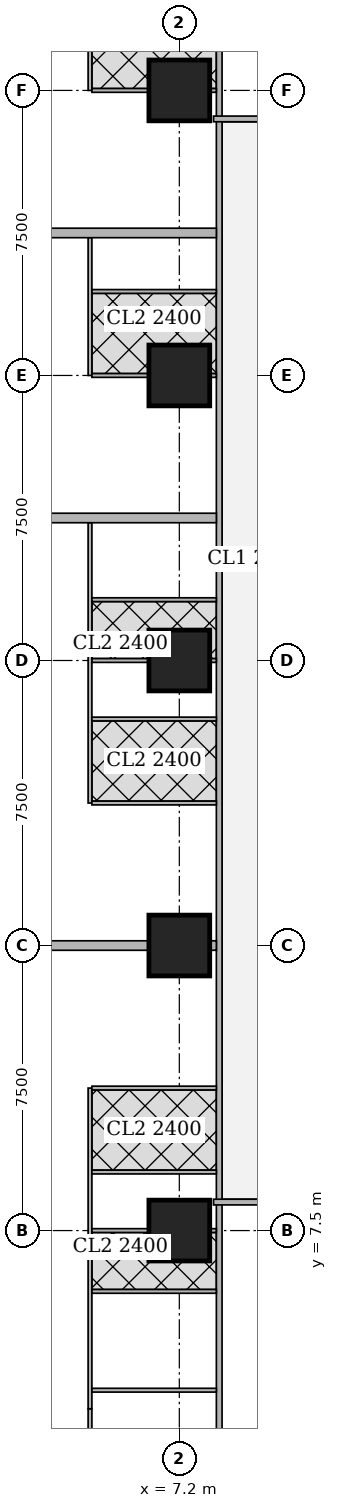
"""IFC4 building model, lengths in metres.
Left out: names, types, materials, properties, quantities, classifications, styles, units other than length and angle.
Written with IfcOpenShell. Run it as: python <this file> out.ifc"""

import sys

from ifc_helpers import new_model, si_unit, direction, frame, frame_2d, origin, origin_2d, place, context, subcontext, project, spatial, rectangle, extrude, element, fill, save


model = new_model("IFC4")
c1 = context("Model", 3, precision=1e-05, world=origin(), true_north=direction((0.0, 1.0)))
c2 = subcontext(c1, "Body", "Model", "MODEL_VIEW")
j1 = project(units=[si_unit("LENGTHUNIT", "METRE"), si_unit("PLANEANGLEUNIT", "RADIAN")], contexts=[c1])
p1 = place(None, origin())
s1 = spatial("IfcSite", under=j1, at=p1, CompositionType="ELEMENT")
p2 = place(p1, origin())
s2 = spatial("IfcBuilding", under=s1, at=p2, CompositionType="ELEMENT")
p3 = place(p2, frame((0.0, 0.0, 100.4)))
s3 = spatial("IfcBuildingStorey", under=s2, at=p3, CompositionType="ELEMENT", Elevation=100.4)
for number, where, z_axis, x_axis in (
    (1, (7.2, 7.5, 0.0), (0.0, 0.0, 1.0), (1.0, 0.0, 0.0)),
    (2, (7.2, 15.0, 0.0), (0.0, 0.0, 1.0), (1.0, 0.0, 0.0)),
    (3, (7.2, 22.5, 0.0), (0.0, 0.0, 1.0), (1.0, 0.0, 0.0)),
    (4, (7.2, 30.0, 0.0), (0.0, 0.0, 1.0), (1.0, 0.0, 0.0)),
    (5, (7.2, 37.5, 0.0), (0.0, 0.0, 1.0), (1.0, 0.0, 0.0)),
):
    element("IfcColumn", number, at=place(p3, frame(where, z_axis=z_axis, x_axis=x_axis)), inside=s3, PredefinedType="COLUMN", context=c2, shape_type="SweptSolid", body=[
        extrude(rectangle(XDim=1.6, YDim=1.6, at=origin_2d()), origin(), (0.0, 0.0, 1.0), 3.75),
    ])
p4 = place(p3, frame((8.25, 2.126, 0.0), z_axis=(0.0, 0.0, 1.0), x_axis=(0.0, 1.0, 0.0)))
e6 = element("IfcWall", 6, at=p4, inside=s3, PredefinedType="SOLIDWALL", context=c2, shape_type="SweptSolid", body=[
    extrude(rectangle(XDim=40.773, YDim=0.15, at=frame_2d((20.386, 0.0))), origin(), (0.0, 0.0, 1.0), 3.5),
])
p5 = place(p4, frame((10.286, 0.0, 0.0)))
e7 = element("IfcOpeningElement", 7, at=p5, cuts=e6, PredefinedType="OPENING", context=c2, shape_type="SweptSolid", body=[
    extrude(rectangle(XDim=1.0, YDim=2.1, at=frame_2d((0.5, 1.05))), frame((0.0, 0.085, 0.0), z_axis=(0.0, -1.0, 0.0), x_axis=(1.0, 0.0, 0.0)), (0.0, 0.0, 1.0), 0.17),
])
p6 = place(p4, frame((14.461, 0.0, 0.0)))
e8 = element("IfcOpeningElement", 8, at=p6, cuts=e6, PredefinedType="OPENING", context=c2, shape_type="SweptSolid", body=[
    extrude(rectangle(XDim=1.0, YDim=2.1, at=frame_2d((0.5, 1.05))), frame((0.0, 0.085, 0.0), z_axis=(0.0, -1.0, 0.0), x_axis=(1.0, 0.0, 0.0)), (0.0, 0.0, 1.0), 0.17),
])
p7 = place(p4, frame((25.287, 0.0, 0.0)))
e9 = element("IfcOpeningElement", 9, at=p7, cuts=e6, PredefinedType="OPENING", context=c2, shape_type="SweptSolid", body=[
    extrude(rectangle(XDim=1.0, YDim=2.1, at=frame_2d((0.5, 1.05))), frame((0.0, 0.085, 0.0), z_axis=(0.0, -1.0, 0.0), x_axis=(1.0, 0.0, 0.0)), (0.0, 0.0, 1.0), 0.17),
])
p8 = place(p4, frame((32.787, 0.0, 0.0)))
e10 = element("IfcOpeningElement", 10, at=p8, cuts=e6, PredefinedType="OPENING", context=c2, shape_type="SweptSolid", body=[
    extrude(rectangle(XDim=1.0, YDim=2.1, at=frame_2d((0.5, 1.05))), frame((0.0, 0.085, 0.0), z_axis=(0.0, -1.0, 0.0), x_axis=(1.0, 0.0, 0.0)), (0.0, 0.0, 1.0), 0.17),
])
p9 = place(p3, frame((13.599, 8.25, 0.0), z_axis=(0.0, 0.0, 1.0), x_axis=(-1.0, 0.0, 0.0)))
e11 = element("IfcWall", 11, at=p9, inside=s3, PredefinedType="SOLIDWALL", context=c2, shape_type="SweptSolid", body=[
    extrude(rectangle(XDim=5.499, YDim=0.15, at=frame_2d((2.75, 0.0))), origin(), (0.0, 0.0, 1.0), 3.5),
])
p10 = place(p9, frame((1.774, 0.0, 0.0)))
e12 = element("IfcOpeningElement", 12, at=p10, cuts=e11, PredefinedType="OPENING", context=c2, shape_type="SweptSolid", body=[
    extrude(rectangle(XDim=1.0, YDim=2.1, at=frame_2d((0.5, 1.05))), frame((0.0, 0.085, 0.0), z_axis=(0.0, -1.0, 0.0), x_axis=(1.0, 0.0, 0.0)), (0.0, 0.0, 1.0), 0.17),
])
p11 = place(p3, frame((8.1, 36.75, 0.0), z_axis=(0.0, 0.0, 1.0), x_axis=(1.0, 0.0, 0.0)))
e13 = element("IfcWall", 13, at=p11, inside=s3, PredefinedType="SOLIDWALL", context=c2, shape_type="SweptSolid", body=[
    extrude(rectangle(XDim=5.499, YDim=0.15, at=frame_2d((2.75, 0.0))), origin(), (0.0, 0.0, 1.0), 3.5),
])
p12 = place(p11, frame((2.725, 0.0, 0.0)))
e14 = element("IfcOpeningElement", 14, at=p12, cuts=e13, PredefinedType="OPENING", context=c2, shape_type="SweptSolid", body=[
    extrude(rectangle(XDim=1.0, YDim=2.1, at=frame_2d((0.5, 1.05))), frame((0.0, 0.085, 0.0), z_axis=(0.0, -1.0, 0.0), x_axis=(1.0, 0.0, 0.0)), (0.0, 0.0, 1.0), 0.17),
])
p13 = place(p3, frame((4.85, 0.326, 0.0), z_axis=(0.0, 0.0, 1.0), x_axis=(0.0, 1.0, 0.0)))
e15 = element("IfcWall", 15, at=p13, inside=s3, PredefinedType="PARTITIONING", context=c2, shape_type="SweptSolid", body=[
    extrude(rectangle(XDim=2.486, YDim=0.1, at=frame_2d((1.243, 0.0))), origin(), (0.0, 0.0, 1.0), 2.05),
])
p14 = place(p3, frame((4.85, 2.812, 0.0), z_axis=(0.0, 0.0, 1.0), x_axis=(0.0, 1.0, 0.0)))
e16 = element("IfcWall", 16, at=p14, inside=s3, PredefinedType="PARTITIONING", context=c2, shape_type="SweptSolid", body=[
    extrude(rectangle(XDim=8.438, YDim=0.1, at=frame_2d((4.219, 0.0))), origin(), (0.0, 0.0, 1.0), 3.5),
])
p15 = place(p14, frame((6.883, 0.0, 0.0)))
e17 = element("IfcOpeningElement", 17, at=p15, cuts=e16, PredefinedType="OPENING", context=c2, shape_type="SweptSolid", body=[
    extrude(rectangle(XDim=0.9, YDim=2.1, at=frame_2d((0.45, 1.05))), frame((0.0, 0.06, 0.0), z_axis=(0.0, -1.0, 0.0), x_axis=(1.0, 0.0, 0.0)), (0.0, 0.0, 1.0), 0.12),
])
p16 = place(p14, frame((3.438, 0.0, 0.0)))
e18 = element("IfcOpeningElement", 18, at=p16, cuts=e16, PredefinedType="OPENING", context=c2, shape_type="SweptSolid", body=[
    extrude(rectangle(XDim=0.9, YDim=2.1, at=frame_2d((0.45, 1.05))), frame((0.0, 0.06, 0.0), z_axis=(0.0, -1.0, 0.0), x_axis=(1.0, 0.0, 0.0)), (0.0, 0.0, 1.0), 0.12),
])
p17 = place(p14, frame((5.008, 0.0, 0.0)))
e19 = element("IfcOpeningElement", 19, at=p17, cuts=e16, PredefinedType="OPENING", context=c2, shape_type="SweptSolid", body=[
    extrude(rectangle(XDim=0.9, YDim=2.1, at=frame_2d((0.45, 1.05))), frame((0.0, 0.06, 0.0), z_axis=(0.0, -1.0, 0.0), x_axis=(1.0, 0.0, 0.0)), (0.0, 0.0, 1.0), 0.12),
])
p18 = place(p14, frame((1.563, 0.0, 0.0)))
e20 = element("IfcOpeningElement", 20, at=p18, cuts=e16, PredefinedType="OPENING", context=c2, shape_type="SweptSolid", body=[
    extrude(rectangle(XDim=0.9, YDim=2.1, at=frame_2d((0.45, 1.05))), frame((0.0, 0.06, 0.0), z_axis=(0.0, -1.0, 0.0), x_axis=(1.0, 0.0, 0.0)), (0.0, 0.0, 1.0), 0.12),
])
p19 = place(p3, frame((4.9, 7.5, 0.0), z_axis=(0.0, 0.0, 1.0), x_axis=(1.0, 0.0, 0.0)))
e21 = element("IfcWall", 21, at=p19, inside=s3, PredefinedType="PARTITIONING", context=c2, shape_type="SweptSolid", body=[
    extrude(rectangle(XDim=1.499, YDim=0.1, at=frame_2d((0.75, 0.0))), origin(), (0.0, 0.0, 1.0), 3.5),
])
p20 = place(p3, frame((8.001, 7.5, 0.0), z_axis=(0.0, 0.0, 1.0), x_axis=(1.0, 0.0, 0.0)))
e22 = element("IfcWall", 22, at=p20, inside=s3, PredefinedType="PARTITIONING", context=c2, shape_type="SweptSolid", body=[
    extrude(rectangle(XDim=0.174, YDim=0.1, at=frame_2d((0.087, 0.0))), origin(), (0.0, 0.0, 1.0), 3.5),
])
for number, where, z_axis, x_axis in (
    (23, (4.9, 11.25, 0.0), (0.0, 0.0, 1.0), (1.0, 0.0, 0.0)),
    (24, (4.9, 9.04, 0.0), (0.0, 0.0, 1.0), (1.0, 0.0, 0.0)),
    (25, (4.9, 5.9, 0.0), (0.0, 0.0, 1.0), (1.0, 0.0, 0.0)),
):
    element("IfcWall", number, at=place(p3, frame(where, z_axis=z_axis, x_axis=x_axis)), inside=s3, PredefinedType="PARTITIONING", context=c2, shape_type="SweptSolid", body=[
        extrude(rectangle(XDim=3.275, YDim=0.1, at=frame_2d((1.638, 0.0))), origin(), (0.0, 0.0, 1.0), 3.5),
    ])
p21 = place(p3, frame((4.85, 18.75, 0.0), z_axis=(0.0, 0.0, 1.0), x_axis=(0.0, 1.0, 0.0)))
e26 = element("IfcWall", 26, at=p21, inside=s3, PredefinedType="PARTITIONING", context=c2, shape_type="SweptSolid", body=[
    extrude(rectangle(XDim=7.375, YDim=0.1, at=frame_2d((3.688, 0.0))), origin(), (0.0, 0.0, 1.0), 3.5),
])
p22 = place(p21, frame((0.655, 0.0, 0.0)))
e27 = element("IfcOpeningElement", 27, at=p22, cuts=e26, PredefinedType="OPENING", context=c2, shape_type="SweptSolid", body=[
    extrude(rectangle(XDim=0.9, YDim=2.1, at=frame_2d((0.45, 1.05))), frame((0.0, 0.06, 0.0), z_axis=(0.0, -1.0, 0.0), x_axis=(1.0, 0.0, 0.0)), (0.0, 0.0, 1.0), 0.12),
])
p23 = place(p21, frame((4.1, 0.0, 0.0)))
e28 = element("IfcOpeningElement", 28, at=p23, cuts=e26, PredefinedType="OPENING", context=c2, shape_type="SweptSolid", body=[
    extrude(rectangle(XDim=0.9, YDim=2.1, at=frame_2d((0.45, 1.05))), frame((0.0, 0.06, 0.0), z_axis=(0.0, -1.0, 0.0), x_axis=(1.0, 0.0, 0.0)), (0.0, 0.0, 1.0), 0.12),
])
p24 = place(p21, frame((2.53, 0.0, 0.0)))
e29 = element("IfcOpeningElement", 29, at=p24, cuts=e26, PredefinedType="OPENING", context=c2, shape_type="SweptSolid", body=[
    extrude(rectangle(XDim=0.9, YDim=2.1, at=frame_2d((0.45, 1.05))), frame((0.0, 0.06, 0.0), z_axis=(0.0, -1.0, 0.0), x_axis=(1.0, 0.0, 0.0)), (0.0, 0.0, 1.0), 0.12),
])
p25 = place(p21, frame((5.975, 0.0, 0.0)))
e30 = element("IfcOpeningElement", 30, at=p25, cuts=e26, PredefinedType="OPENING", context=c2, shape_type="SweptSolid", body=[
    extrude(rectangle(XDim=0.9, YDim=2.1, at=frame_2d((0.45, 1.05))), frame((0.0, 0.06, 0.0), z_axis=(0.0, -1.0, 0.0), x_axis=(1.0, 0.0, 0.0)), (0.0, 0.0, 1.0), 0.12),
])
p26 = place(p3, frame((4.9, 18.75, 0.0), z_axis=(0.0, 0.0, 1.0), x_axis=(1.0, 0.0, 0.0)))
e31 = element("IfcWall", 31, at=p26, inside=s3, PredefinedType="PARTITIONING", context=c2, shape_type="SweptSolid", body=[
    extrude(rectangle(XDim=3.275, YDim=0.1, at=frame_2d((1.638, 0.0))), origin(), (0.0, 0.0, 1.0), 3.5),
])
p27 = place(p3, frame((4.9, 22.5, 0.0), z_axis=(0.0, 0.0, 1.0), x_axis=(1.0, 0.0, 0.0)))
e32 = element("IfcWall", 32, at=p27, inside=s3, PredefinedType="PARTITIONING", context=c2, shape_type="SweptSolid", body=[
    extrude(rectangle(XDim=1.499, YDim=0.1, at=frame_2d((0.75, 0.0))), origin(), (0.0, 0.0, 1.0), 3.5),
])
p28 = place(p3, frame((8.001, 22.5, 0.0), z_axis=(0.0, 0.0, 1.0), x_axis=(1.0, 0.0, 0.0)))
e33 = element("IfcWall", 33, at=p28, inside=s3, PredefinedType="PARTITIONING", context=c2, shape_type="SweptSolid", body=[
    extrude(rectangle(XDim=0.174, YDim=0.1, at=frame_2d((0.087, 0.0))), origin(), (0.0, 0.0, 1.0), 3.5),
])
for number, where, z_axis, x_axis in (
    (34, (4.9, 20.96, 0.0), (0.0, 0.0, 1.0), (1.0, 0.0, 0.0)),
    (35, (4.9, 24.1, 0.0), (0.0, 0.0, 1.0), (1.0, 0.0, 0.0)),
):
    element("IfcWall", number, at=place(p3, frame(where, z_axis=z_axis, x_axis=x_axis)), inside=s3, PredefinedType="PARTITIONING", context=c2, shape_type="SweptSolid", body=[
        extrude(rectangle(XDim=3.275, YDim=0.1, at=frame_2d((1.638, 0.0))), origin(), (0.0, 0.0, 1.0), 3.5),
    ])
p29 = place(p3, frame((3.65, 15.0, 0.0), z_axis=(0.0, 0.0, 1.0), x_axis=(1.0, 0.0, 0.0)))
e36 = element("IfcWall", 36, at=p29, inside=s3, PredefinedType="SOLIDWALL", context=c2, shape_type="SweptSolid", body=[
    extrude(rectangle(XDim=2.749, YDim=0.25, at=frame_2d((1.375, 0.0))), origin(), (0.0, 0.0, 1.0), 3.5),
])
p30 = place(p3, frame((8.001, 15.0, 0.0), z_axis=(0.0, 0.0, 1.0), x_axis=(1.0, 0.0, 0.0)))
e37 = element("IfcWall", 37, at=p30, inside=s3, PredefinedType="SOLIDWALL", context=c2, shape_type="SweptSolid", body=[
    extrude(rectangle(XDim=0.174, YDim=0.25, at=frame_2d((0.087, 0.0))), origin(), (0.0, 0.0, 1.0), 3.5),
])
p31 = place(p3, frame((4.85, 30.0, 0.0), z_axis=(0.0, 0.0, 1.0), x_axis=(0.0, 1.0, 0.0)))
e38 = element("IfcWall", 38, at=p31, inside=s3, PredefinedType="PARTITIONING", context=c2, shape_type="SweptSolid", body=[
    extrude(rectangle(XDim=3.625, YDim=0.1, at=frame_2d((1.812, 0.0))), origin(), (0.0, 0.0, 1.0), 3.5),
])
p32 = place(p31, frame((0.655, 0.0, 0.0)))
e39 = element("IfcOpeningElement", 39, at=p32, cuts=e38, PredefinedType="OPENING", context=c2, shape_type="SweptSolid", body=[
    extrude(rectangle(XDim=0.9, YDim=2.1, at=frame_2d((0.45, 1.05))), frame((0.0, 0.06, 0.0), z_axis=(0.0, -1.0, 0.0), x_axis=(1.0, 0.0, 0.0)), (0.0, 0.0, 1.0), 0.12),
])
p33 = place(p31, frame((2.53, 0.0, 0.0)))
e40 = element("IfcOpeningElement", 40, at=p33, cuts=e38, PredefinedType="OPENING", context=c2, shape_type="SweptSolid", body=[
    extrude(rectangle(XDim=0.9, YDim=2.1, at=frame_2d((0.45, 1.05))), frame((0.0, 0.06, 0.0), z_axis=(0.0, -1.0, 0.0), x_axis=(1.0, 0.0, 0.0)), (0.0, 0.0, 1.0), 0.12),
])
p34 = place(p3, frame((4.9, 30.0, 0.0), z_axis=(0.0, 0.0, 1.0), x_axis=(1.0, 0.0, 0.0)))
e41 = element("IfcWall", 41, at=p34, inside=s3, PredefinedType="PARTITIONING", context=c2, shape_type="SweptSolid", body=[
    extrude(rectangle(XDim=1.499, YDim=0.1, at=frame_2d((0.75, 0.0))), origin(), (0.0, 0.0, 1.0), 3.5),
])
p35 = place(p3, frame((8.001, 30.0, 0.0), z_axis=(0.0, 0.0, 1.0), x_axis=(1.0, 0.0, 0.0)))
e42 = element("IfcWall", 42, at=p35, inside=s3, PredefinedType="PARTITIONING", context=c2, shape_type="SweptSolid", body=[
    extrude(rectangle(XDim=0.174, YDim=0.1, at=frame_2d((0.087, 0.0))), origin(), (0.0, 0.0, 1.0), 3.5),
])
p36 = place(p3, frame((4.9, 32.21, 0.0), z_axis=(0.0, 0.0, 1.0), x_axis=(1.0, 0.0, 0.0)))
e43 = element("IfcWall", 43, at=p36, inside=s3, PredefinedType="PARTITIONING", context=c2, shape_type="SweptSolid", body=[
    extrude(rectangle(XDim=3.275, YDim=0.1, at=frame_2d((1.638, 0.0))), origin(), (0.0, 0.0, 1.0), 3.5),
])
p37 = place(p3, frame((3.65, 26.25, 0.0), z_axis=(0.0, 0.0, 1.0), x_axis=(1.0, 0.0, 0.0)))
e44 = element("IfcWall", 44, at=p37, inside=s3, PredefinedType="SOLIDWALL", context=c2, shape_type="SweptSolid", body=[
    extrude(rectangle(XDim=4.525, YDim=0.25, at=frame_2d((2.263, 0.0))), origin(), (0.0, 0.0, 1.0), 3.5),
])
p38 = place(p3, frame((4.85, 37.5, 0.0), z_axis=(0.0, 0.0, 1.0), x_axis=(0.0, 1.0, 0.0)))
e45 = element("IfcWall", 45, at=p38, inside=s3, PredefinedType="PARTITIONING", context=c2, shape_type="SweptSolid", body=[
    extrude(rectangle(XDim=4.699, YDim=0.1, at=frame_2d((2.35, 0.0))), origin(), (0.0, 0.0, 1.0), 3.5),
])
p39 = place(p38, frame((0.655, 0.0, 0.0)))
e46 = element("IfcOpeningElement", 46, at=p39, cuts=e45, PredefinedType="OPENING", context=c2, shape_type="SweptSolid", body=[
    extrude(rectangle(XDim=0.9, YDim=2.1, at=frame_2d((0.45, 1.05))), frame((0.0, 0.06, 0.0), z_axis=(0.0, -1.0, 0.0), x_axis=(1.0, 0.0, 0.0)), (0.0, 0.0, 1.0), 0.12),
])
p40 = place(p38, frame((2.53, 0.0, 0.0)))
e47 = element("IfcOpeningElement", 47, at=p40, cuts=e45, PredefinedType="OPENING", context=c2, shape_type="SweptSolid", body=[
    extrude(rectangle(XDim=0.9, YDim=2.1, at=frame_2d((0.45, 1.05))), frame((0.0, 0.06, 0.0), z_axis=(0.0, -1.0, 0.0), x_axis=(1.0, 0.0, 0.0)), (0.0, 0.0, 1.0), 0.12),
])
p41 = place(p3, frame((4.9, 37.5, 0.0), z_axis=(0.0, 0.0, 1.0), x_axis=(1.0, 0.0, 0.0)))
e48 = element("IfcWall", 48, at=p41, inside=s3, PredefinedType="PARTITIONING", context=c2, shape_type="SweptSolid", body=[
    extrude(rectangle(XDim=1.499, YDim=0.1, at=frame_2d((0.75, 0.0))), origin(), (0.0, 0.0, 1.0), 3.5),
])
p42 = place(p3, frame((8.001, 37.5, 0.0), z_axis=(0.0, 0.0, 1.0), x_axis=(1.0, 0.0, 0.0)))
e49 = element("IfcWall", 49, at=p42, inside=s3, PredefinedType="PARTITIONING", context=c2, shape_type="SweptSolid", body=[
    extrude(rectangle(XDim=0.174, YDim=0.1, at=frame_2d((0.087, 0.0))), origin(), (0.0, 0.0, 1.0), 3.5),
])
p43 = place(p3, frame((3.65, 33.75, 0.0), z_axis=(0.0, 0.0, 1.0), x_axis=(1.0, 0.0, 0.0)))
e50 = element("IfcWall", 50, at=p43, inside=s3, PredefinedType="SOLIDWALL", context=c2, shape_type="SweptSolid", body=[
    extrude(rectangle(XDim=4.525, YDim=0.25, at=frame_2d((2.263, 0.0))), origin(), (0.0, 0.0, 1.0), 3.5),
])
p44 = place(p3, frame((8.175, 3.3, 0.0), z_axis=(0.0, 0.0, 1.0), x_axis=(-1.0, 0.0, 0.0)))
e51 = element("IfcWall", 51, at=p44, inside=s3, PredefinedType="PARTITIONING", context=c2, shape_type="SweptSolid", body=[
    extrude(rectangle(XDim=3.275, YDim=0.1, at=frame_2d((1.638, 0.0))), origin(), (0.0, 0.0, 1.0), 3.5),
])
p45 = place(p44, frame((2.1, 0.0, 0.0)))
e52 = element("IfcOpeningElement", 52, at=p45, cuts=e51, PredefinedType="OPENING", context=c2, shape_type="SweptSolid", body=[
    extrude(rectangle(XDim=0.9, YDim=2.1, at=frame_2d((0.45, 1.05))), frame((0.0, 0.06, 0.0), z_axis=(0.0, -1.0, 0.0), x_axis=(1.0, 0.0, 0.0)), (0.0, 0.0, 1.0), 0.12),
])
p46 = place(p15, origin())
e53 = element("IfcDoor", 53, at=p46, inside=s3, OperationType="SINGLE_SWING_LEFT", PredefinedType="DOOR", context=c2, shape_type="SweptSolid", body=[
    extrude(rectangle(XDim=0.9, YDim=2.1, at=frame_2d((0.45, 1.05))), frame((0.0, 0.025, 0.0), z_axis=(0.0, -1.0, 0.0), x_axis=(1.0, 0.0, 0.0)), (0.0, 0.0, 1.0), 0.05),
])
fill(e17, e53)
p47 = place(p16, origin())
e54 = element("IfcDoor", 54, at=p47, inside=s3, OperationType="SINGLE_SWING_LEFT", PredefinedType="DOOR", context=c2, shape_type="SweptSolid", body=[
    extrude(rectangle(XDim=0.9, YDim=2.1, at=frame_2d((0.45, 1.05))), frame((0.0, 0.025, 0.0), z_axis=(0.0, -1.0, 0.0), x_axis=(1.0, 0.0, 0.0)), (0.0, 0.0, 1.0), 0.05),
])
fill(e18, e54)
p48 = place(p17, origin())
e55 = element("IfcDoor", 55, at=p48, inside=s3, OperationType="SINGLE_SWING_RIGHT", PredefinedType="DOOR", context=c2, shape_type="SweptSolid", body=[
    extrude(rectangle(XDim=0.9, YDim=2.1, at=frame_2d((0.45, 1.05))), frame((0.0, 0.025, 0.0), z_axis=(0.0, -1.0, 0.0), x_axis=(1.0, 0.0, 0.0)), (0.0, 0.0, 1.0), 0.05),
])
fill(e19, e55)
p49 = place(p18, origin())
e56 = element("IfcDoor", 56, at=p49, inside=s3, OperationType="SINGLE_SWING_LEFT", PredefinedType="DOOR", context=c2, shape_type="SweptSolid", body=[
    extrude(rectangle(XDim=0.9, YDim=2.1, at=frame_2d((0.45, 1.05))), frame((0.0, 0.025, 0.0), z_axis=(0.0, -1.0, 0.0), x_axis=(1.0, 0.0, 0.0)), (0.0, 0.0, 1.0), 0.05),
])
fill(e20, e56)
p50 = place(p5, origin())
e57 = element("IfcDoor", 57, at=p50, inside=s3, OperationType="SINGLE_SWING_LEFT", PredefinedType="DOOR", context=c2, shape_type="SweptSolid", body=[
    extrude(rectangle(XDim=1.0, YDim=2.1, at=frame_2d((0.5, 1.05))), frame((0.0, 0.025, 0.0), z_axis=(0.0, -1.0, 0.0), x_axis=(1.0, 0.0, 0.0)), (0.0, 0.0, 1.0), 0.05),
])
fill(e7, e57)
p51 = place(p22, origin())
e58 = element("IfcDoor", 58, at=p51, inside=s3, OperationType="SINGLE_SWING_RIGHT", PredefinedType="DOOR", context=c2, shape_type="SweptSolid", body=[
    extrude(rectangle(XDim=0.9, YDim=2.1, at=frame_2d((0.45, 1.05))), frame((0.0, 0.025, 0.0), z_axis=(0.0, -1.0, 0.0), x_axis=(1.0, 0.0, 0.0)), (0.0, 0.0, 1.0), 0.05),
])
fill(e27, e58)
p52 = place(p23, origin())
e59 = element("IfcDoor", 59, at=p52, inside=s3, OperationType="SINGLE_SWING_LEFT", PredefinedType="DOOR", context=c2, shape_type="SweptSolid", body=[
    extrude(rectangle(XDim=0.9, YDim=2.1, at=frame_2d((0.45, 1.05))), frame((0.0, 0.025, 0.0), z_axis=(0.0, -1.0, 0.0), x_axis=(1.0, 0.0, 0.0)), (0.0, 0.0, 1.0), 0.05),
])
fill(e28, e59)
p53 = place(p24, origin())
e60 = element("IfcDoor", 60, at=p53, inside=s3, OperationType="SINGLE_SWING_LEFT", PredefinedType="DOOR", context=c2, shape_type="SweptSolid", body=[
    extrude(rectangle(XDim=0.9, YDim=2.1, at=frame_2d((0.45, 1.05))), frame((0.0, 0.025, 0.0), z_axis=(0.0, -1.0, 0.0), x_axis=(1.0, 0.0, 0.0)), (0.0, 0.0, 1.0), 0.05),
])
fill(e29, e60)
p54 = place(p25, origin())
e61 = element("IfcDoor", 61, at=p54, inside=s3, OperationType="SINGLE_SWING_LEFT", PredefinedType="DOOR", context=c2, shape_type="SweptSolid", body=[
    extrude(rectangle(XDim=0.9, YDim=2.1, at=frame_2d((0.45, 1.05))), frame((0.0, 0.025, 0.0), z_axis=(0.0, -1.0, 0.0), x_axis=(1.0, 0.0, 0.0)), (0.0, 0.0, 1.0), 0.05),
])
fill(e30, e61)
p55 = place(p6, origin())
e62 = element("IfcDoor", 62, at=p55, inside=s3, OperationType="SINGLE_SWING_RIGHT", PredefinedType="DOOR", context=c2, shape_type="SweptSolid", body=[
    extrude(rectangle(XDim=1.0, YDim=2.1, at=frame_2d((0.5, 1.05))), frame((0.0, 0.025, 0.0), z_axis=(0.0, -1.0, 0.0), x_axis=(1.0, 0.0, 0.0)), (0.0, 0.0, 1.0), 0.05),
])
fill(e8, e62)
p56 = place(p32, origin())
e63 = element("IfcDoor", 63, at=p56, inside=s3, OperationType="SINGLE_SWING_RIGHT", PredefinedType="DOOR", context=c2, shape_type="SweptSolid", body=[
    extrude(rectangle(XDim=0.9, YDim=2.1, at=frame_2d((0.45, 1.05))), frame((0.0, 0.025, 0.0), z_axis=(0.0, -1.0, 0.0), x_axis=(1.0, 0.0, 0.0)), (0.0, 0.0, 1.0), 0.05),
])
fill(e39, e63)
p57 = place(p33, origin())
e64 = element("IfcDoor", 64, at=p57, inside=s3, OperationType="SINGLE_SWING_LEFT", PredefinedType="DOOR", context=c2, shape_type="SweptSolid", body=[
    extrude(rectangle(XDim=0.9, YDim=2.1, at=frame_2d((0.45, 1.05))), frame((0.0, 0.025, 0.0), z_axis=(0.0, -1.0, 0.0), x_axis=(1.0, 0.0, 0.0)), (0.0, 0.0, 1.0), 0.05),
])
fill(e40, e64)
p58 = place(p7, origin())
e65 = element("IfcDoor", 65, at=p58, inside=s3, OperationType="SINGLE_SWING_LEFT", PredefinedType="DOOR", context=c2, shape_type="SweptSolid", body=[
    extrude(rectangle(XDim=1.0, YDim=2.1, at=frame_2d((0.5, 1.05))), frame((0.0, 0.025, 0.0), z_axis=(0.0, -1.0, 0.0), x_axis=(1.0, 0.0, 0.0)), (0.0, 0.0, 1.0), 0.05),
])
fill(e9, e65)
p59 = place(p39, origin())
e66 = element("IfcDoor", 66, at=p59, inside=s3, OperationType="SINGLE_SWING_RIGHT", PredefinedType="DOOR", context=c2, shape_type="SweptSolid", body=[
    extrude(rectangle(XDim=0.9, YDim=2.1, at=frame_2d((0.45, 1.05))), frame((0.0, 0.025, 0.0), z_axis=(0.0, -1.0, 0.0), x_axis=(1.0, 0.0, 0.0)), (0.0, 0.0, 1.0), 0.05),
])
fill(e46, e66)
p60 = place(p8, origin())
e67 = element("IfcDoor", 67, at=p60, inside=s3, OperationType="SINGLE_SWING_LEFT", PredefinedType="DOOR", context=c2, shape_type="SweptSolid", body=[
    extrude(rectangle(XDim=1.0, YDim=2.1, at=frame_2d((0.5, 1.05))), frame((0.0, 0.025, 0.0), z_axis=(0.0, -1.0, 0.0), x_axis=(1.0, 0.0, 0.0)), (0.0, 0.0, 1.0), 0.05),
])
fill(e10, e67)
p61 = place(p45, origin())
e68 = element("IfcDoor", 68, at=p61, inside=s3, OperationType="SINGLE_SWING_LEFT", PredefinedType="DOOR", context=c2, shape_type="SweptSolid", body=[
    extrude(rectangle(XDim=0.9, YDim=2.1, at=frame_2d((0.45, 1.05))), frame((0.0, 0.025, 0.0), z_axis=(0.0, -1.0, 0.0), x_axis=(1.0, 0.0, 0.0)), (0.0, 0.0, 1.0), 0.05),
])
fill(e52, e68)
save(model, sys.argv[1])
